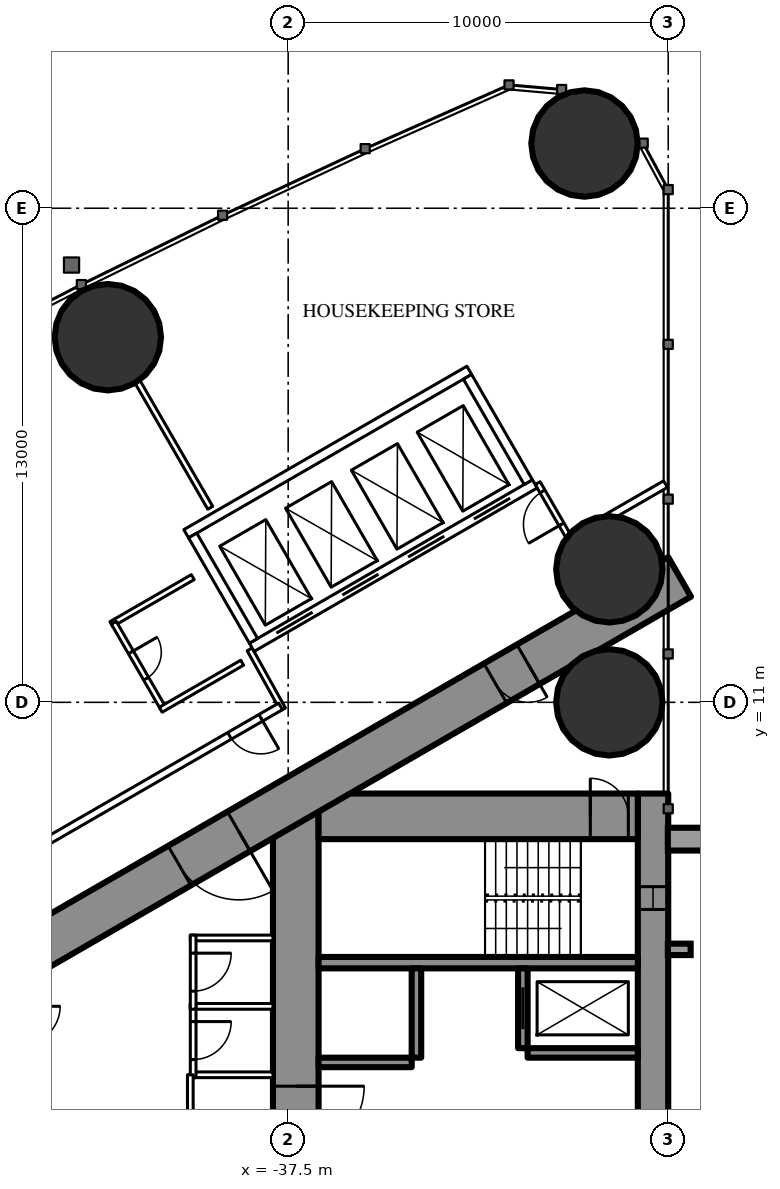
"""IFC4 building model, lengths in metres.
Left out: names, types, materials, properties, quantities, classifications, styles, units other than length and angle.
Written with IfcOpenShell. Run it as: python <this file> out.ifc"""

import sys

from ifc_helpers import new_model, si_unit, direction, frame, frame_2d, origin, origin_2d, place, context, subcontext, project, spatial, rectangle, hollow_circle, extrude, element, fill, save


model = new_model("IFC4")
c1 = context("Model", 3, precision=1e-05, world=origin(), true_north=direction((0.0, 1.0)))
c2 = subcontext(c1, "Body", "Model", "MODEL_VIEW")
j1 = project(units=[si_unit("LENGTHUNIT", "METRE"), si_unit("PLANEANGLEUNIT", "RADIAN")], contexts=[c1])
p1 = place(None, origin())
s1 = spatial("IfcSite", under=j1, at=p1, CompositionType="ELEMENT")
p2 = place(p1, origin())
s2 = spatial("IfcBuilding", under=s1, at=p2, CompositionType="ELEMENT")
p3 = place(p2, frame((0.0, 0.0, 74.0)))
s3 = spatial("IfcBuildingStorey", under=s2, at=p3, CompositionType="ELEMENT", Elevation=74.0)
for number, where, z_axis, x_axis in (
    (1, (-29.703, 25.703, 0.0), (0.0, 0.0, 1.0), (1.0, 0.0, 0.0)),
    (2, (-29.05, 11.0, 0.0), (0.0, 0.0, 1.0), (1.0, 0.0, 0.0)),
    (3, (-29.05, 14.5, 0.0), (0.0, 0.0, 1.0), (1.0, 0.0, 0.0)),
    (4, (-42.245, 20.607, 0.0), (0.0, 0.0, 1.0), (1.0, 0.0, 0.0)),
):
    element("IfcColumn", number, at=place(p3, frame(where, z_axis=z_axis, x_axis=x_axis)), inside=s3, PredefinedType="COLUMN", context=c2, shape_type="SweptSolid", body=[
        extrude(hollow_circle(Radius=1.4, WallThickness=0.12, at=origin_2d()), origin(), (0.0, 0.0, 1.0), 3.5),
    ])
p4 = place(p3, frame((-27.9, 8.6, 0.0), z_axis=(0.0, 0.0, 1.0), x_axis=(0.0, -1.0, 0.0)))
e5 = element("IfcWall", 5, at=p4, inside=s3, PredefinedType="SHEAR", context=c2, shape_type="SweptSolid", body=[
    extrude(rectangle(XDim=17.2, YDim=0.8, at=frame_2d((8.6, 0.0))), origin(), (0.0, 0.0, 1.0), 3.5),
])
p5 = place(p4, frame((2.45, 0.0, 0.6)))
e6 = element("IfcOpeningElement", 6, at=p5, cuts=e5, PredefinedType="OPENING", context=c2, shape_type="SweptSolid", body=[
    extrude(rectangle(XDim=0.6, YDim=2.1, at=frame_2d((0.3, 1.05))), frame((0.0, 0.41, 0.0), z_axis=(0.0, -1.0, 0.0), x_axis=(1.0, 0.0, 0.0)), (0.0, 0.0, 1.0), 0.82),
])
p6 = place(p4, frame((14.15, 0.0, 0.6)))
e7 = element("IfcOpeningElement", 7, at=p6, cuts=e5, PredefinedType="OPENING", context=c2, shape_type="SweptSolid", body=[
    extrude(rectangle(XDim=0.6, YDim=2.1, at=frame_2d((0.3, 1.05))), frame((0.0, 0.41, 0.0), z_axis=(0.0, -1.0, 0.0), x_axis=(1.0, 0.0, 0.0)), (0.0, 0.0, 1.0), 0.82),
])
p7 = place(p3, frame((-37.3, 8.6, 0.0), z_axis=(0.0, 0.0, 1.0), x_axis=(0.0, -1.0, 0.0)))
e8 = element("IfcWall", 8, at=p7, inside=s3, PredefinedType="SHEAR", context=c2, shape_type="SweptSolid", body=[
    extrude(rectangle(XDim=17.2, YDim=1.2, at=frame_2d((8.6, 0.0))), origin(), (0.0, 0.0, 1.0), 3.5),
])
p8 = place(p7, frame((7.7, 0.0, 0.0)))
e9 = element("IfcOpeningElement", 9, at=p8, cuts=e8, PredefinedType="OPENING", context=c2, shape_type="SweptSolid", body=[
    extrude(rectangle(XDim=1.8, YDim=2.2, at=frame_2d((0.9, 1.1))), frame((0.0, 0.61, 0.0), z_axis=(0.0, -1.0, 0.0), x_axis=(1.0, 0.0, 0.0)), (0.0, 0.0, 1.0), 1.22),
])
p9 = place(p3, frame((-28.3, 8.0, 0.0), z_axis=(0.0, 0.0, 1.0), x_axis=(-1.0, 0.0, 0.0)))
e10 = element("IfcWall", 10, at=p9, inside=s3, PredefinedType="SHEAR", context=c2, shape_type="SweptSolid", body=[
    extrude(rectangle(XDim=8.4, YDim=1.2, at=frame_2d((4.2, 0.0))), origin(), (0.0, 0.0, 1.0), 3.5),
])
p10 = place(p9, frame((0.25, 0.0, 0.0)))
e11 = element("IfcOpeningElement", 11, at=p10, cuts=e10, PredefinedType="OPENING", context=c2, shape_type="SweptSolid", body=[
    extrude(rectangle(XDim=1.0, YDim=2.2, at=frame_2d((0.5, 1.1))), frame((0.0, 0.61, 0.0), z_axis=(0.0, -1.0, 0.0), x_axis=(1.0, 0.0, 0.0)), (0.0, 0.0, 1.0), 1.22),
])
p11 = place(p3, frame((-28.3, 4.15, 0.0), z_axis=(0.0, 0.0, 1.0), x_axis=(-1.0, 0.0, 0.0)))
e12 = element("IfcWall", 12, at=p11, inside=s3, PredefinedType="SHEAR", context=c2, shape_type="SweptSolid", body=[
    extrude(rectangle(XDim=8.4, YDim=0.3, at=frame_2d((4.2, 0.0))), origin(), (0.0, 0.0, 1.0), 3.5),
])
p12 = place(p3, frame((-31.325, 4.0, 0.0), z_axis=(0.0, 0.0, 1.0), x_axis=(0.0, -1.0, 0.0)))
e13 = element("IfcWall", 13, at=p12, inside=s3, PredefinedType="SHEAR", context=c2, shape_type="SweptSolid", body=[
    extrude(rectangle(XDim=2.1, YDim=0.25, at=frame_2d((1.05, 0.0))), origin(), (0.0, 0.0, 1.0), 3.5),
])
p13 = place(p12, frame((0.5, 0.0, 0.0)))
e14 = element("IfcOpeningElement", 14, at=p13, cuts=e13, PredefinedType="OPENING", context=c2, shape_type="SweptSolid", body=[
    extrude(rectangle(XDim=1.1, YDim=2.2, at=frame_2d((0.55, 1.1))), frame((0.0, 0.135, 0.0), z_axis=(0.0, -1.0, 0.0), x_axis=(1.0, 0.0, 0.0)), (0.0, 0.0, 1.0), 0.27),
])
p14 = place(p3, frame((-34.125, 4.0, 0.0), z_axis=(0.0, 0.0, 1.0), x_axis=(0.0, -1.0, 0.0)))
e15 = element("IfcWall", 15, at=p14, inside=s3, PredefinedType="SHEAR", context=c2, shape_type="SweptSolid", body=[
    extrude(rectangle(XDim=2.35, YDim=0.25, at=frame_2d((1.175, 0.0))), origin(), (0.0, 0.0, 1.0), 3.5),
])
p15 = place(p3, frame((-28.3, 1.775, 0.0), z_axis=(0.0, 0.0, 1.0), x_axis=(-1.0, 0.0, 0.0)))
e16 = element("IfcWall", 16, at=p15, inside=s3, PredefinedType="SHEAR", context=c2, shape_type="SweptSolid", body=[
    extrude(rectangle(XDim=2.9, YDim=0.25, at=frame_2d((1.45, 0.0))), origin(), (0.0, 0.0, 1.0), 3.5),
])
p16 = place(p3, frame((-34.25, 1.525, 0.0), z_axis=(0.0, 0.0, 1.0), x_axis=(-1.0, 0.0, 0.0)))
e17 = element("IfcWall", 17, at=p16, inside=s3, PredefinedType="SHEAR", context=c2, shape_type="SweptSolid", body=[
    extrude(rectangle(XDim=2.45, YDim=0.25, at=frame_2d((1.225, 0.0))), origin(), (0.0, 0.0, 1.0), 3.5),
])
p17 = place(p3, frame((-27.2, 14.3, 0.0), z_axis=(0.0, 0.0, 1.0), x_axis=(-0.866026593062, -0.499997940104, 0.0)))
e18 = element("IfcWall", 18, at=p17, inside=s3, PredefinedType="SHEAR", context=c2, shape_type="SweptSolid", body=[
    extrude(rectangle(XDim=28.946, YDim=1.2, at=frame_2d((14.473, 0.0))), origin(), (0.0, 0.0, 1.0), 3.5),
])
p18 = place(p17, frame((4.6, 0.0, 0.0)))
e19 = element("IfcOpeningElement", 19, at=p18, cuts=e18, PredefinedType="OPENING", context=c2, shape_type="SweptSolid", body=[
    extrude(rectangle(XDim=1.0, YDim=2.2, at=frame_2d((0.5, 1.1))), frame((0.0, 0.61, 0.0), z_axis=(0.0, -1.0, 0.0), x_axis=(1.0, 0.0, 0.0)), (0.0, 0.0, 1.0), 1.22),
])
p19 = place(p17, frame((13.395, 0.0, 0.0)))
e20 = element("IfcOpeningElement", 20, at=p19, cuts=e18, PredefinedType="OPENING", context=c2, shape_type="SweptSolid", body=[
    extrude(rectangle(XDim=1.8, YDim=2.2, at=frame_2d((0.9, 1.1))), frame((0.0, 0.61, 0.0), z_axis=(0.0, -1.0, 0.0), x_axis=(1.0, 0.0, 0.0)), (0.0, 0.0, 1.0), 1.22),
])
p20 = place(p3, frame((-39.551, 16.119, 0.0), z_axis=(0.0, 0.0, 1.0), x_axis=(-0.500014214979, 0.866017196607, 0.0)))
e21 = element("IfcWall", 21, at=p20, inside=s3, PredefinedType="PARTITIONING", context=c2, shape_type="SweptSolid", body=[
    extrude(rectangle(XDim=3.815, YDim=0.15, at=frame_2d((1.907, 0.0))), origin(), (0.0, 0.0, 1.0), 3.25),
])
p21 = place(p3, frame((-27.572, 16.741, 0.0), z_axis=(0.0, 0.0, 1.0), x_axis=(-0.866034618596, -0.499984039138, 0.0)))
e22 = element("IfcWall", 22, at=p21, inside=s3, PredefinedType="PARTITIONING", context=c2, shape_type="SweptSolid", body=[
    extrude(rectangle(XDim=2.854, YDim=0.2, at=frame_2d((1.427, 0.0))), origin(), (0.0, 0.0, 1.0), 3.25),
])
p22 = place(p3, frame((-38.513, 12.392, 0.0), z_axis=(0.0, 0.0, 1.0), x_axis=(0.485585508183, -0.874189175317, 0.0)))
e23 = element("IfcWall", 23, at=p22, inside=s3, PredefinedType="PARTITIONING", context=c2, shape_type="SweptSolid", body=[
    extrude(rectangle(XDim=1.805, YDim=0.15, at=frame_2d((0.902, 0.0))), origin(), (0.0, 0.0, 1.0), 3.25),
])
p23 = place(p3, frame((-30.033, 15.205, 0.0), z_axis=(0.0, 0.0, 1.0), x_axis=(-0.499980071345, 0.866036909293, 0.0)))
e24 = element("IfcWall", 24, at=p23, inside=s3, PredefinedType="PARTITIONING", context=c2, shape_type="SweptSolid", body=[
    extrude(rectangle(XDim=1.805, YDim=0.15, at=frame_2d((0.902, 0.0))), origin(), (0.0, 0.0, 1.0), 3.25),
])
p24 = place(p23, frame((0.552, 0.0, 0.0)))
e25 = element("IfcOpeningElement", 25, at=p24, cuts=e24, PredefinedType="OPENING", context=c2, shape_type="SweptSolid", body=[
    extrude(rectangle(XDim=1.0, YDim=2.2, at=frame_2d((0.5, 1.1))), frame((0.0, 0.085, 0.0), z_axis=(0.0, -1.0, 0.0), x_axis=(1.0, 0.0, 0.0)), (0.0, 0.0, 1.0), 0.17),
])
p25 = place(p3, frame((-37.7, 10.894, 0.0), z_axis=(0.0, 0.0, 1.0), x_axis=(-0.866024459167, -0.500001636122, 0.0)))
e26 = element("IfcWall", 26, at=p25, inside=s3, PredefinedType="PARTITIONING", context=c2, shape_type="SweptSolid", body=[
    extrude(rectangle(XDim=11.38, YDim=0.2, at=frame_2d((5.69, 0.0))), origin(), (0.0, 0.0, 1.0), 3.25),
])
p26 = place(p25, frame((0.6, 0.0, 0.0)))
e27 = element("IfcOpeningElement", 27, at=p26, cuts=e26, PredefinedType="OPENING", context=c2, shape_type="SweptSolid", body=[
    extrude(rectangle(XDim=0.95, YDim=2.2, at=frame_2d((0.475, 1.1))), frame((0.0, 0.11, 0.0), z_axis=(0.0, -1.0, 0.0), x_axis=(1.0, 0.0, 0.0)), (0.0, 0.0, 1.0), 0.22),
])
p27 = place(p3, frame((-40.01, 14.294, 0.0), z_axis=(0.0, 0.0, 1.0), x_axis=(-0.866031185235, -0.4999899861, 0.0)))
e28 = element("IfcWall", 28, at=p27, inside=s3, PredefinedType="PARTITIONING", context=c2, shape_type="SweptSolid", body=[
    extrude(rectangle(XDim=2.475, YDim=0.15, at=frame_2d((1.238, 0.0))), origin(), (0.0, 0.0, 1.0), 3.25),
])
p28 = place(p3, frame((-40.788, 10.843, 0.0), z_axis=(0.0, 0.0, 1.0), x_axis=(-0.500006934395, 0.866021400173, 0.0)))
e29 = element("IfcWall", 29, at=p28, inside=s3, PredefinedType="PARTITIONING", context=c2, shape_type="SweptSolid", body=[
    extrude(rectangle(XDim=2.6, YDim=0.15, at=frame_2d((1.3, 0.0))), origin(), (0.0, 0.0, 1.0), 3.25),
])
p29 = place(p28, frame((0.9, 0.0, 0.0)))
e30 = element("IfcOpeningElement", 30, at=p29, cuts=e29, PredefinedType="OPENING", context=c2, shape_type="SweptSolid", body=[
    extrude(rectangle(XDim=0.8, YDim=2.2, at=frame_2d((0.4, 1.1))), frame((0.0, 0.085, 0.0), z_axis=(0.0, -1.0, 0.0), x_axis=(1.0, 0.0, 0.0)), (0.0, 0.0, 1.0), 0.17),
])
p30 = place(p3, frame((-38.71, 12.042, 0.0), z_axis=(0.0, 0.0, 1.0), x_axis=(-0.86604923931, -0.499958713387, 0.0)))
e31 = element("IfcWall", 31, at=p30, inside=s3, PredefinedType="PARTITIONING", context=c2, shape_type="SweptSolid", body=[
    extrude(rectangle(XDim=2.475, YDim=0.15, at=frame_2d((1.237, 0.0))), origin(), (0.0, 0.0, 1.0), 3.25),
])
for number, where, z_axis, x_axis in (
    (32, (-37.9, 1.2, 0.0), (0.0, 0.0, 1.0), (-1.0, 0.0, 0.0)),
    (33, (-37.9, 3.0, 0.0), (0.0, 0.0, 1.0), (-1.0, 0.0, 0.0)),
    (34, (-37.9, 4.8, 0.0), (0.0, 0.0, 1.0), (-1.0, 0.0, 0.0)),
):
    element("IfcWall", number, at=place(p3, frame(where, z_axis=z_axis, x_axis=x_axis)), inside=s3, PredefinedType="PARTITIONING", context=c2, shape_type="SweptSolid", body=[
        extrude(rectangle(XDim=2.175, YDim=0.15, at=frame_2d((1.087, 0.0))), origin(), (0.0, 0.0, 1.0), 3.25),
    ])
p31 = place(p3, frame((-40.0, 3.075, 0.0), z_axis=(0.0, 0.0, 1.0), x_axis=(0.0, -1.0, 0.0)))
e35 = element("IfcWall", 35, at=p31, inside=s3, PredefinedType="PARTITIONING", context=c2, shape_type="SweptSolid", body=[
    extrude(rectangle(XDim=1.95, YDim=0.15, at=frame_2d((0.975, 0.0))), origin(), (0.0, 0.0, 1.0), 3.25),
])
p32 = place(p31, frame((0.475, 0.0, 0.0)))
e36 = element("IfcOpeningElement", 36, at=p32, cuts=e35, PredefinedType="OPENING", context=c2, shape_type="SweptSolid", body=[
    extrude(rectangle(XDim=1.0, YDim=2.2, at=frame_2d((0.5, 1.1))), frame((0.0, 0.085, 0.0), z_axis=(0.0, -1.0, 0.0), x_axis=(1.0, 0.0, 0.0)), (0.0, 0.0, 1.0), 0.17),
])
p33 = place(p3, frame((-40.0, 4.875, 0.0), z_axis=(0.0, 0.0, 1.0), x_axis=(0.0, -1.0, 0.0)))
e37 = element("IfcWall", 37, at=p33, inside=s3, PredefinedType="PARTITIONING", context=c2, shape_type="SweptSolid", body=[
    extrude(rectangle(XDim=1.95, YDim=0.15, at=frame_2d((0.975, 0.0))), origin(), (0.0, 0.0, 1.0), 3.25),
])
p34 = place(p33, frame((0.475, 0.0, 0.0)))
e38 = element("IfcOpeningElement", 38, at=p34, cuts=e37, PredefinedType="OPENING", context=c2, shape_type="SweptSolid", body=[
    extrude(rectangle(XDim=1.0, YDim=2.2, at=frame_2d((0.5, 1.1))), frame((0.0, 0.085, 0.0), z_axis=(0.0, -1.0, 0.0), x_axis=(1.0, 0.0, 0.0)), (0.0, 0.0, 1.0), 0.17),
])
p35 = place(p3, frame((-40.075, 1.2, 0.0), z_axis=(0.0, 0.0, 1.0), x_axis=(0.0, -1.0, 0.0)))
e39 = element("IfcWall", 39, at=p35, inside=s3, PredefinedType="PARTITIONING", context=c2, shape_type="SweptSolid", body=[
    extrude(rectangle(XDim=7.374, YDim=0.15, at=frame_2d((3.687, 0.0))), origin(), (0.0, 0.0, 1.0), 3.25),
])
p36 = place(p35, frame((2.787, 0.0, 0.0)))
e40 = element("IfcOpeningElement", 40, at=p36, cuts=e39, PredefinedType="OPENING", context=c2, shape_type="SweptSolid", body=[
    extrude(rectangle(XDim=1.8, YDim=2.2, at=frame_2d((0.9, 1.1))), frame((0.0, 0.085, 0.0), z_axis=(0.0, -1.0, 0.0), x_axis=(1.0, 0.0, 0.0)), (0.0, 0.0, 1.0), 0.17),
])
p37 = place(p3, frame((-31.01, 16.747, 0.0), z_axis=(0.0, 0.0, 1.0), x_axis=(-0.866028165386, -0.499995216735, 0.0)))
e41 = element("IfcWall", 41, at=p37, inside=s3, PredefinedType="PARTITIONING", context=c2, shape_type="SweptSolid", body=[
    extrude(rectangle(XDim=8.6, YDim=0.25, at=frame_2d((4.3, 0.0))), origin(), (0.0, 0.0, 1.0), 3.25),
])
p38 = place(p37, frame((0.75, 0.0, 0.0)))
e42 = element("IfcOpeningElement", 42, at=p38, cuts=e41, PredefinedType="OPENING", context=c2, shape_type="SweptSolid", body=[
    extrude(rectangle(XDim=1.1, YDim=2.2, at=frame_2d((0.55, 1.1))), frame((0.0, 0.135, 0.0), z_axis=(0.0, -1.0, 0.0), x_axis=(1.0, 0.0, 0.0)), (0.0, 0.0, 1.0), 0.27),
])
p39 = place(p37, frame((2.75, 0.0, 0.0)))
e43 = element("IfcOpeningElement", 43, at=p39, cuts=e41, PredefinedType="OPENING", context=c2, shape_type="SweptSolid", body=[
    extrude(rectangle(XDim=1.1, YDim=2.2, at=frame_2d((0.55, 1.1))), frame((0.0, 0.135, 0.0), z_axis=(0.0, -1.0, 0.0), x_axis=(1.0, 0.0, 0.0)), (0.0, 0.0, 1.0), 0.27),
])
p40 = place(p37, frame((4.75, 0.0, 0.0)))
e44 = element("IfcOpeningElement", 44, at=p40, cuts=e41, PredefinedType="OPENING", context=c2, shape_type="SweptSolid", body=[
    extrude(rectangle(XDim=1.1, YDim=2.2, at=frame_2d((0.55, 1.1))), frame((0.0, 0.135, 0.0), z_axis=(0.0, -1.0, 0.0), x_axis=(1.0, 0.0, 0.0)), (0.0, 0.0, 1.0), 0.27),
])
p41 = place(p37, frame((6.75, 0.0, 0.0)))
e45 = element("IfcOpeningElement", 45, at=p41, cuts=e41, PredefinedType="OPENING", context=c2, shape_type="SweptSolid", body=[
    extrude(rectangle(XDim=1.1, YDim=2.2, at=frame_2d((0.55, 1.1))), frame((0.0, 0.135, 0.0), z_axis=(0.0, -1.0, 0.0), x_axis=(1.0, 0.0, 0.0)), (0.0, 0.0, 1.0), 0.27),
])
p42 = place(p3, frame((-32.736, 19.736, 0.0), z_axis=(0.0, 0.0, 1.0), x_axis=(-0.866028165386, -0.499995216735, 0.0)))
e46 = element("IfcWall", 46, at=p42, inside=s3, PredefinedType="PARTITIONING", context=c2, shape_type="SweptSolid", body=[
    extrude(rectangle(XDim=8.6, YDim=0.25, at=frame_2d((4.3, 0.0))), origin(), (0.0, 0.0, 1.0), 3.25),
])
p43 = place(p3, frame((-31.181, 16.793, 0.0), z_axis=(0.0, 0.0, 1.0), x_axis=(-0.499929347863, 0.866066190972, 0.0)))
e47 = element("IfcWall", 47, at=p43, inside=s3, PredefinedType="PARTITIONING", context=c2, shape_type="SweptSolid", body=[
    extrude(rectangle(XDim=3.201, YDim=0.25, at=frame_2d((1.6, 0.0))), origin(), (0.0, 0.0, 1.0), 3.25),
])
p44 = place(p3, frame((-38.413, 12.618, 0.0), z_axis=(0.0, 0.0, 1.0), x_axis=(-0.499872130319, 0.866099216793, 0.0)))
e48 = element("IfcWall", 48, at=p44, inside=s3, PredefinedType="PARTITIONING", context=c2, shape_type="SweptSolid", body=[
    extrude(rectangle(XDim=3.2, YDim=0.25, at=frame_2d((1.6, 0.0))), origin(), (0.0, 0.0, 1.0), 3.25),
])
p45 = place(p29, origin())
e49 = element("IfcDoor", 49, at=p45, inside=s3, OperationType="SINGLE_SWING_RIGHT", PredefinedType="DOOR", context=c2, shape_type="SweptSolid", body=[
    extrude(rectangle(XDim=0.8, YDim=2.2, at=frame_2d((0.4, 1.1))), frame((0.0, 0.025, 0.0), z_axis=(0.0, -1.0, 0.0), x_axis=(1.0, 0.0, 0.0)), (0.0, 0.0, 1.0), 0.05),
])
fill(e30, e49)
p46 = place(p26, origin())
e50 = element("IfcDoor", 50, at=p46, inside=s3, OperationType="SINGLE_SWING_LEFT", PredefinedType="DOOR", context=c2, shape_type="SweptSolid", body=[
    extrude(rectangle(XDim=0.95, YDim=2.2, at=frame_2d((0.475, 1.1))), frame((0.0, 0.025, 0.0), z_axis=(0.0, -1.0, 0.0), x_axis=(1.0, 0.0, 0.0)), (0.0, 0.0, 1.0), 0.05),
])
fill(e27, e50)
p47 = place(p24, origin())
e51 = element("IfcDoor", 51, at=p47, inside=s3, OperationType="SINGLE_SWING_LEFT", PredefinedType="DOOR", context=c2, shape_type="SweptSolid", body=[
    extrude(rectangle(XDim=1.0, YDim=2.2, at=frame_2d((0.5, 1.1))), frame((0.0, 0.025, 0.0), z_axis=(0.0, -1.0, 0.0), x_axis=(1.0, 0.0, 0.0)), (0.0, 0.0, 1.0), 0.05),
])
fill(e25, e51)
p48 = place(p32, origin())
e52 = element("IfcDoor", 52, at=p48, inside=s3, OperationType="SINGLE_SWING_LEFT", PredefinedType="DOOR", context=c2, shape_type="SweptSolid", body=[
    extrude(rectangle(XDim=1.0, YDim=2.2, at=frame_2d((0.5, 1.1))), frame((0.0, 0.025, 0.0), z_axis=(0.0, -1.0, 0.0), x_axis=(1.0, 0.0, 0.0)), (0.0, 0.0, 1.0), 0.05),
])
fill(e36, e52)
p49 = place(p34, origin())
e53 = element("IfcDoor", 53, at=p49, inside=s3, OperationType="SINGLE_SWING_LEFT", PredefinedType="DOOR", context=c2, shape_type="SweptSolid", body=[
    extrude(rectangle(XDim=1.0, YDim=2.2, at=frame_2d((0.5, 1.1))), frame((0.0, 0.025, 0.0), z_axis=(0.0, -1.0, 0.0), x_axis=(1.0, 0.0, 0.0)), (0.0, 0.0, 1.0), 0.05),
])
fill(e38, e53)
p50 = place(p18, origin())
e54 = element("IfcDoor", 54, at=p50, inside=s3, OperationType="SINGLE_SWING_LEFT", PredefinedType="DOOR", context=c2, shape_type="SweptSolid", body=[
    extrude(rectangle(XDim=1.0, YDim=2.2, at=frame_2d((0.5, 1.1))), frame((0.0, 0.025, 0.0), z_axis=(0.0, -1.0, 0.0), x_axis=(1.0, 0.0, 0.0)), (0.0, 0.0, 1.0), 0.05),
])
fill(e19, e54)
p51 = place(p19, origin())
e55 = element("IfcDoor", 55, at=p51, inside=s3, OperationType="DOUBLE_DOOR_SINGLE_SWING", PredefinedType="DOOR", context=c2, shape_type="SweptSolid", body=[
    extrude(rectangle(XDim=1.8, YDim=2.2, at=frame_2d((0.9, 1.1))), frame((0.0, 0.025, 0.0), z_axis=(0.0, -1.0, 0.0), x_axis=(1.0, 0.0, 0.0)), (0.0, 0.0, 1.0), 0.05),
])
fill(e20, e55)
p52 = place(p8, origin())
e56 = element("IfcDoor", 56, at=p52, inside=s3, OperationType="DOUBLE_DOOR_SINGLE_SWING", PredefinedType="DOOR", context=c2, shape_type="SweptSolid", body=[
    extrude(rectangle(XDim=1.8, YDim=2.2, at=frame_2d((0.9, 1.1))), frame((0.0, 0.025, 0.0), z_axis=(0.0, -1.0, 0.0), x_axis=(1.0, 0.0, 0.0)), (0.0, 0.0, 1.0), 0.05),
])
fill(e9, e56)
p53 = place(p10, origin())
e57 = element("IfcDoor", 57, at=p53, inside=s3, OperationType="SINGLE_SWING_RIGHT", PredefinedType="DOOR", context=c2, shape_type="SweptSolid", body=[
    extrude(rectangle(XDim=1.0, YDim=2.2, at=frame_2d((0.5, 1.1))), frame((0.0, 0.025, 0.0), z_axis=(0.0, -1.0, 0.0), x_axis=(1.0, 0.0, 0.0)), (0.0, 0.0, 1.0), 0.05),
])
fill(e11, e57)
p54 = place(p13, origin())
e58 = element("IfcDoor", 58, at=p54, inside=s3, OperationType="SLIDING_TO_LEFT", PredefinedType="USERDEFINED", context=c2, shape_type="SweptSolid", body=[
    extrude(rectangle(XDim=1.1, YDim=2.2, at=frame_2d((0.55, 1.1))), frame((0.0, 0.025, 0.0), z_axis=(0.0, -1.0, 0.0), x_axis=(1.0, 0.0, 0.0)), (0.0, 0.0, 1.0), 0.05),
])
fill(e14, e58)
p55 = place(p38, origin())
e59 = element("IfcDoor", 59, at=p55, inside=s3, OperationType="DOUBLE_DOOR_SLIDING", PredefinedType="USERDEFINED", context=c2, shape_type="SweptSolid", body=[
    extrude(rectangle(XDim=1.1, YDim=2.2, at=frame_2d((0.55, 1.1))), frame((0.0, 0.025, 0.0), z_axis=(0.0, -1.0, 0.0), x_axis=(1.0, 0.0, 0.0)), (0.0, 0.0, 1.0), 0.05),
])
fill(e42, e59)
p56 = place(p39, origin())
e60 = element("IfcDoor", 60, at=p56, inside=s3, OperationType="DOUBLE_DOOR_SLIDING", PredefinedType="USERDEFINED", context=c2, shape_type="SweptSolid", body=[
    extrude(rectangle(XDim=1.1, YDim=2.2, at=frame_2d((0.55, 1.1))), frame((0.0, 0.025, 0.0), z_axis=(0.0, -1.0, 0.0), x_axis=(1.0, 0.0, 0.0)), (0.0, 0.0, 1.0), 0.05),
])
fill(e43, e60)
p57 = place(p40, origin())
e61 = element("IfcDoor", 61, at=p57, inside=s3, OperationType="DOUBLE_DOOR_SLIDING", PredefinedType="USERDEFINED", context=c2, shape_type="SweptSolid", body=[
    extrude(rectangle(XDim=1.1, YDim=2.2, at=frame_2d((0.55, 1.1))), frame((0.0, 0.025, 0.0), z_axis=(0.0, -1.0, 0.0), x_axis=(1.0, 0.0, 0.0)), (0.0, 0.0, 1.0), 0.05),
])
fill(e44, e61)
p58 = place(p41, origin())
e62 = element("IfcDoor", 62, at=p58, inside=s3, OperationType="DOUBLE_DOOR_SLIDING", PredefinedType="USERDEFINED", context=c2, shape_type="SweptSolid", body=[
    extrude(rectangle(XDim=1.1, YDim=2.2, at=frame_2d((0.55, 1.1))), frame((0.0, 0.025, 0.0), z_axis=(0.0, -1.0, 0.0), x_axis=(1.0, 0.0, 0.0)), (0.0, 0.0, 1.0), 0.05),
])
fill(e45, e62)
p59 = place(p5, origin())
e63 = element("IfcWindow", 63, at=p59, inside=s3, PartitioningType="SINGLE_PANEL", PredefinedType="WINDOW", context=c2, shape_type="SweptSolid", body=[
    extrude(rectangle(XDim=0.6, YDim=2.1, at=frame_2d((0.3, 1.05))), frame((0.0, 0.03, 0.0), z_axis=(0.0, -1.0, 0.0), x_axis=(1.0, 0.0, 0.0)), (0.0, 0.0, 1.0), 0.06),
])
fill(e6, e63)
save(model, sys.argv[1])
